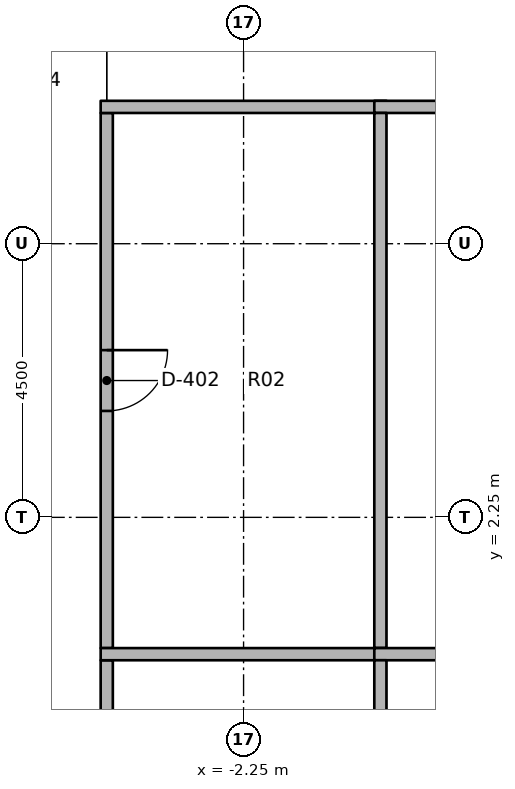
"""IFC4 building model, lengths in metres.
Left out: names, types, materials, properties, quantities, classifications, styles, units other than length and angle.
Written with IfcOpenShell. Run it as: python <this file> out.ifc"""

import sys

from ifc_helpers import new_model, si_unit, direction, frame, frame_2d, origin, place, context, subcontext, project, spatial, rectangle, extrude, element, fill, save


model = new_model("IFC4")
c1 = context("Model", 3, precision=1e-05, world=origin(), true_north=direction((0.0, 1.0)))
c2 = subcontext(c1, "Body", "Model", "MODEL_VIEW")
j1 = project(units=[si_unit("LENGTHUNIT", "METRE"), si_unit("PLANEANGLEUNIT", "RADIAN")], contexts=[c1])
p1 = place(None, origin())
s1 = spatial("IfcSite", under=j1, at=p1, CompositionType="ELEMENT")
p2 = place(p1, origin())
s2 = spatial("IfcBuilding", under=s1, at=p2, CompositionType="ELEMENT")
p3 = place(p2, frame((0.0, 0.0, 56.4)))
s3 = spatial("IfcBuildingStorey", under=s2, at=p3, CompositionType="ELEMENT", Elevation=56.4)
p4 = place(p3, frame((-4.5, 8.9, 0.0), z_axis=(0.0, 0.0, 1.0), x_axis=(0.0, -1.0, 0.0)))
e1 = element("IfcWall", 1, at=p4, inside=s3, PredefinedType="PARTITIONING", context=c2, shape_type="SweptSolid", body=[
    extrude(rectangle(XDim=8.8, YDim=0.2, at=frame_2d((4.4, 0.0))), origin(), (0.0, 0.0, 1.0), 3.131),
])
p5 = place(p4, frame((3.9, 0.0, 0.0)))
e2 = element("IfcOpeningElement", 2, at=p5, cuts=e1, PredefinedType="OPENING", context=c2, shape_type="SweptSolid", body=[
    extrude(rectangle(XDim=1.0, YDim=2.1, at=frame_2d((0.5, 1.05))), frame((0.0, 0.11, 0.0), z_axis=(0.0, -1.0, 0.0), x_axis=(1.0, 0.0, 0.0)), (0.0, 0.0, 1.0), 0.22),
])
p6 = place(p3, frame((-4.5, -0.1, 0.0), z_axis=(0.0, 0.0, 1.0), x_axis=(0.0, -1.0, 0.0)))
e3 = element("IfcWall", 3, at=p6, inside=s3, PredefinedType="PARTITIONING", context=c2, shape_type="SweptSolid", body=[
    extrude(rectangle(XDim=8.8, YDim=0.2, at=frame_2d((4.4, 0.0))), origin(), (0.0, 0.0, 1.0), 3.131),
])
p7 = place(p6, frame((3.9, 0.0, 0.0)))
e4 = element("IfcOpeningElement", 4, at=p7, cuts=e3, PredefinedType="OPENING", context=c2, shape_type="SweptSolid", body=[
    extrude(rectangle(XDim=1.0, YDim=2.1, at=frame_2d((0.5, 1.05))), frame((0.0, 0.11, 0.0), z_axis=(0.0, -1.0, 0.0), x_axis=(1.0, 0.0, 0.0)), (0.0, 0.0, 1.0), 0.22),
])
for number, where, z_axis, x_axis in (
    (5, (-4.6, 9.0, 0.0), (0.0, 0.0, 1.0), (1.0, 0.0, 0.0)),
    (6, (-0.1, 9.0, 0.0), (0.0, 0.0, 1.0), (1.0, 0.0, 0.0)),
):
    element("IfcWall", number, at=place(p3, frame(where, z_axis=z_axis, x_axis=x_axis)), inside=s3, PredefinedType="PARTITIONING", context=c2, shape_type="SweptSolid", body=[
        extrude(rectangle(XDim=4.7, YDim=0.2, at=frame_2d((2.35, 0.0))), origin(), (0.0, 0.0, 1.0), 3.131),
    ])
p8 = place(p3, frame((0.0, 0.1, 0.0), z_axis=(0.0, 0.0, 1.0), x_axis=(0.0, 1.0, 0.0)))
e7 = element("IfcWall", 7, at=p8, inside=s3, PredefinedType="PARTITIONING", context=c2, shape_type="SweptSolid", body=[
    extrude(rectangle(XDim=8.8, YDim=0.2, at=frame_2d((4.4, 0.0))), origin(), (0.0, 0.0, 1.0), 3.131),
])
for number, where, z_axis, x_axis in (
    (8, (-4.6, 0.0, 0.0), (0.0, 0.0, 1.0), (1.0, 0.0, 0.0)),
    (9, (-0.1, 0.0, 0.0), (0.0, 0.0, 1.0), (1.0, 0.0, 0.0)),
):
    element("IfcWall", number, at=place(p3, frame(where, z_axis=z_axis, x_axis=x_axis)), inside=s3, PredefinedType="PARTITIONING", context=c2, shape_type="SweptSolid", body=[
        extrude(rectangle(XDim=4.7, YDim=0.2, at=frame_2d((2.35, 0.0))), origin(), (0.0, 0.0, 1.0), 3.131),
    ])
p9 = place(p3, frame((0.0, -8.9, 0.0), z_axis=(0.0, 0.0, 1.0), x_axis=(0.0, 1.0, 0.0)))
e10 = element("IfcWall", 10, at=p9, inside=s3, PredefinedType="PARTITIONING", context=c2, shape_type="SweptSolid", body=[
    extrude(rectangle(XDim=8.8, YDim=0.2, at=frame_2d((4.4, 0.0))), origin(), (0.0, 0.0, 1.0), 3.131),
])
p10 = place(p5, origin())
e11 = element("IfcDoor", 11, at=p10, inside=s3, OperationType="SINGLE_SWING_RIGHT", PredefinedType="DOOR", context=c2, shape_type="SweptSolid", body=[
    extrude(rectangle(XDim=1.0, YDim=2.1, at=frame_2d((0.5, 1.05))), frame((0.0, 0.025, 0.0), z_axis=(0.0, -1.0, 0.0), x_axis=(1.0, 0.0, 0.0)), (0.0, 0.0, 1.0), 0.05),
])
fill(e2, e11)
save(model, sys.argv[1])
